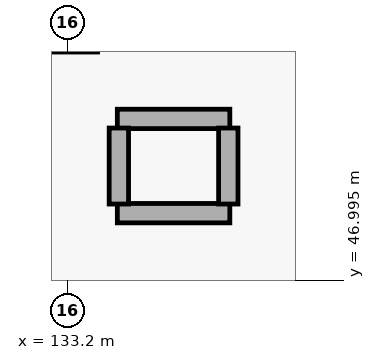
"""IFC4 building model, lengths in metres.
Left out: names, types, materials, properties, quantities, classifications, styles, units other than length and angle.
Written with IfcOpenShell. Run it as: python <this file> out.ifc"""

import sys

from ifc_helpers import new_model, si_unit, direction, frame, frame_2d, origin, origin_2d, place, context, subcontext, project, spatial, rectangle, extrude, element, save


model = new_model("IFC4")
c1 = context("Model", 3, precision=1e-05, world=origin(), true_north=direction((0.0, 1.0)))
c2 = subcontext(c1, "Body", "Model", "MODEL_VIEW")
j1 = project(units=[si_unit("LENGTHUNIT", "METRE"), si_unit("PLANEANGLEUNIT", "RADIAN")], contexts=[c1])
p1 = place(None, origin())
s1 = spatial("IfcSite", under=j1, at=p1, CompositionType="ELEMENT")
p2 = place(p1, origin())
s2 = spatial("IfcBuilding", under=s1, at=p2, CompositionType="ELEMENT")
p3 = place(p2, origin())
s3 = spatial("IfcBuildingStorey", under=s2, at=p3, CompositionType="ELEMENT", Elevation=0.0)
p4 = place(p3, frame((133.2, 50.4, 0.0), z_axis=(0.0, 0.0, 1.0), x_axis=(1.0, 0.0, 0.0)))
e1 = element("IfcColumn", 1, at=p4, inside=s3, PredefinedType="COLUMN", context=c2, shape_type="SweptSolid", body=[
    extrude(rectangle(XDim=0.8, YDim=0.8, at=origin_2d()), origin(), (0.0, 0.0, 1.0), 5.4),
])
for number, where, z_axis, x_axis in (
    (2, (133.86, 49.12, 0.0), (0.0, 0.0, 1.0), (1.0, 0.0, 0.0)),
    (3, (133.86, 47.88, 0.0), (0.0, 0.0, 1.0), (1.0, 0.0, 0.0)),
):
    element("IfcWall", number, at=place(p3, frame(where, z_axis=z_axis, x_axis=x_axis)), inside=s3, PredefinedType="PARTITIONING", context=c2, shape_type="SweptSolid", body=[
        extrude(rectangle(XDim=1.48, YDim=0.255, at=frame_2d((0.74, 0.0))), origin(), (0.0, 0.0, 1.0), 5.04),
    ])
for number, where, z_axis, x_axis in (
    (4, (133.88, 48.0, 0.0), (0.0, 0.0, 1.0), (0.0, 1.0, 0.0)),
    (5, (135.32, 48.0, 0.0), (0.0, 0.0, 1.0), (0.0, 1.0, 0.0)),
):
    element("IfcWall", number, at=place(p3, frame(where, z_axis=z_axis, x_axis=x_axis)), inside=s3, PredefinedType="PARTITIONING", context=c2, shape_type="SweptSolid", body=[
        extrude(rectangle(XDim=1.0, YDim=0.255, at=frame_2d((0.5, 0.0))), origin(), (0.0, 0.0, 1.0), 5.04),
    ])
save(model, sys.argv[1])
